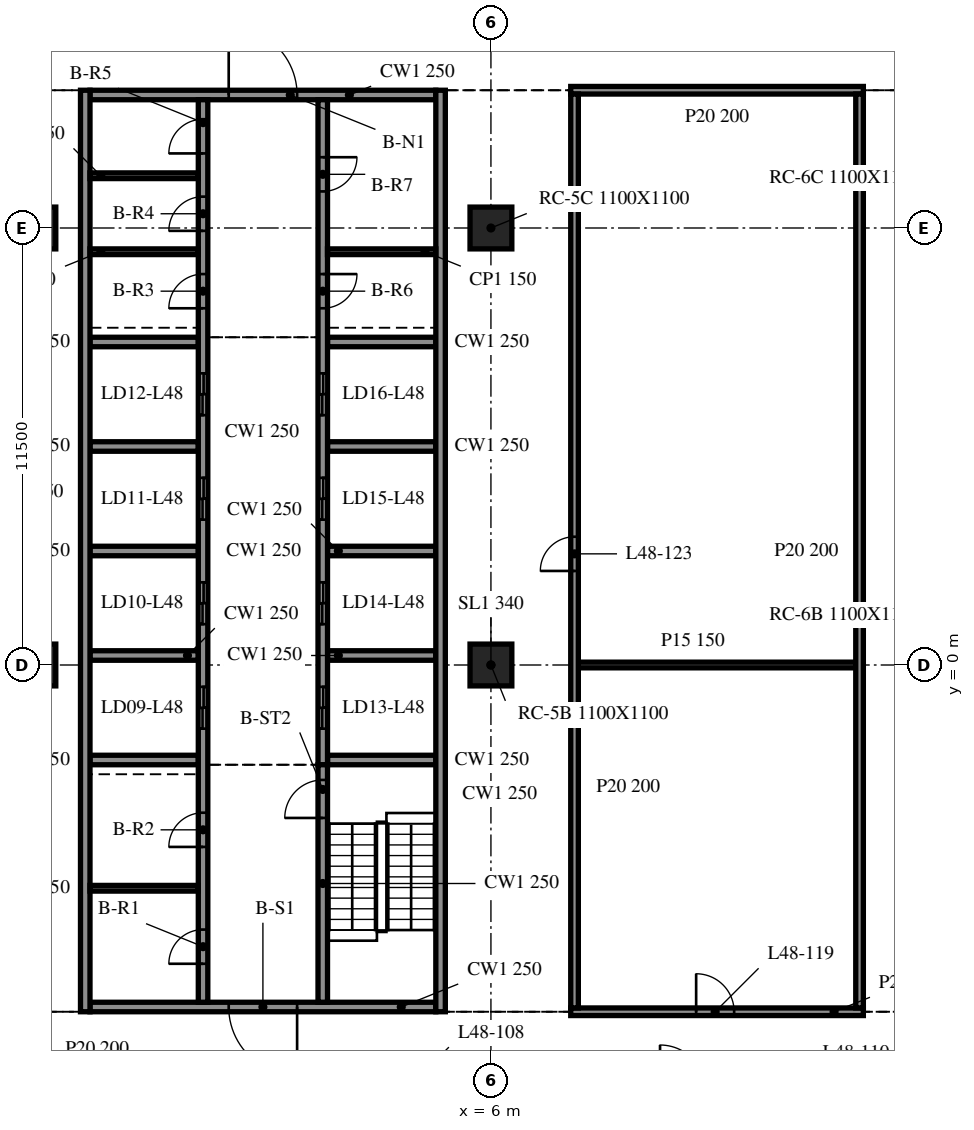
"""IFC4 building model, lengths in metres.
Left out: names, types, materials, properties, quantities, classifications, styles, units other than length and angle.
Written with IfcOpenShell. Run it as: python <this file> out.ifc"""

import sys

from ifc_helpers import new_model, si_unit, direction, frame, frame_2d, origin, origin_2d, place, context, subcontext, project, spatial, rectangle, extrude, element, fill, save


model = new_model("IFC4")
c1 = context("Model", 3, precision=1e-05, world=origin(), true_north=direction((0.0, 1.0)))
c2 = subcontext(c1, "Body", "Model", "MODEL_VIEW")
j1 = project(units=[si_unit("LENGTHUNIT", "METRE"), si_unit("PLANEANGLEUNIT", "RADIAN")], contexts=[c1])
p1 = place(None, origin())
s1 = spatial("IfcSite", under=j1, at=p1, CompositionType="ELEMENT")
p2 = place(p1, origin())
s2 = spatial("IfcBuilding", under=s1, at=p2, CompositionType="ELEMENT")
p3 = place(p2, frame((0.0, 0.0, 201.5)))
s3 = spatial("IfcBuildingStorey", under=s2, at=p3, CompositionType="ELEMENT", Elevation=201.5)
for number, where, z_axis, x_axis in (
    (1, (-6.0, 0.0, -0.34), (0.0, 0.0, 1.0), (1.0, 0.0, 0.0)),
    (2, (-6.0, 11.5, -0.34), (0.0, 0.0, 1.0), (1.0, 0.0, 0.0)),
    (3, (6.0, 0.0, -0.34), (0.0, 0.0, 1.0), (1.0, 0.0, 0.0)),
    (4, (6.0, 11.5, -0.34), (0.0, 0.0, 1.0), (1.0, 0.0, 0.0)),
):
    element("IfcColumn", number, at=place(p3, frame(where, z_axis=z_axis, x_axis=x_axis)), inside=s3, PredefinedType="COLUMN", context=c2, shape_type="SweptSolid", body=[
        extrude(rectangle(XDim=1.1, YDim=1.1, at=origin_2d()), origin(), (0.0, 0.0, 1.0), 3.8),
    ])
for number, where, z_axis, x_axis in (
    (5, (-4.675, 15.125, 0.0), (0.0, 0.0, 1.0), (0.0, -1.0, 0.0)),
    (6, (4.675, -9.125, 0.0), (0.0, 0.0, 1.0), (0.0, 1.0, 0.0)),
):
    element("IfcWall", number, at=place(p3, frame(where, z_axis=z_axis, x_axis=x_axis)), inside=s3, PredefinedType="SOLIDWALL", context=c2, shape_type="SweptSolid", body=[
        extrude(rectangle(XDim=24.25, YDim=0.25, at=frame_2d((12.125, 0.0))), origin(), (0.0, 0.0, 1.0), 3.46),
    ])
p4 = place(p3, frame((4.55, -9.0, 0.0), z_axis=(0.0, 0.0, 1.0), x_axis=(-1.0, 0.0, 0.0)))
e7 = element("IfcWall", 7, at=p4, inside=s3, PredefinedType="SOLIDWALL", context=c2, shape_type="SweptSolid", body=[
    extrude(rectangle(XDim=9.1, YDim=0.25, at=frame_2d((4.55, 0.0))), origin(), (0.0, 0.0, 1.0), 3.46),
])
p5 = place(p4, frame((3.65, 0.0, 0.0)))
e8 = element("IfcOpeningElement", 8, at=p5, cuts=e7, PredefinedType="OPENING", context=c2, shape_type="SweptSolid", body=[
    extrude(rectangle(XDim=1.8, YDim=2.1, at=frame_2d((0.9, 1.05))), frame((0.0, 0.135, 0.0), z_axis=(0.0, -1.0, 0.0), x_axis=(1.0, 0.0, 0.0)), (0.0, 0.0, 1.0), 0.27),
])
p6 = place(p3, frame((-4.55, 15.0, 0.0), z_axis=(0.0, 0.0, 1.0), x_axis=(1.0, 0.0, 0.0)))
e9 = element("IfcWall", 9, at=p6, inside=s3, PredefinedType="SOLIDWALL", context=c2, shape_type="SweptSolid", body=[
    extrude(rectangle(XDim=9.1, YDim=0.25, at=frame_2d((4.55, 0.0))), origin(), (0.0, 0.0, 1.0), 3.46),
])
p7 = place(p6, frame((3.65, 0.0, 0.0)))
e10 = element("IfcOpeningElement", 10, at=p7, cuts=e9, PredefinedType="OPENING", context=c2, shape_type="SweptSolid", body=[
    extrude(rectangle(XDim=1.8, YDim=2.1, at=frame_2d((0.9, 1.05))), frame((0.0, 0.135, 0.0), z_axis=(0.0, -1.0, 0.0), x_axis=(1.0, 0.0, 0.0)), (0.0, 0.0, 1.0), 0.27),
])
p8 = place(p3, frame((-1.575, -8.875, 0.0), z_axis=(0.0, 0.0, 1.0), x_axis=(0.0, 1.0, 0.0)))
e11 = element("IfcWall", 11, at=p8, inside=s3, PredefinedType="SOLIDWALL", context=c2, shape_type="SweptSolid", body=[
    extrude(rectangle(XDim=23.75, YDim=0.25, at=frame_2d((11.875, 0.0))), origin(), (0.0, 0.0, 1.0), 3.46),
])
p9 = place(p8, frame((7.2, 0.0, 0.0)))
e12 = element("IfcOpeningElement", 12, at=p9, cuts=e11, PredefinedType="OPENING", context=c2, shape_type="SweptSolid", body=[
    extrude(rectangle(XDim=1.1, YDim=2.1, at=frame_2d((0.55, 1.05))), frame((0.0, 0.135, 0.0), z_axis=(0.0, -1.0, 0.0), x_axis=(1.0, 0.0, 0.0)), (0.0, 0.0, 1.0), 0.27),
])
p10 = place(p8, frame((9.95, 0.0, 0.0)))
e13 = element("IfcOpeningElement", 13, at=p10, cuts=e11, PredefinedType="OPENING", context=c2, shape_type="SweptSolid", body=[
    extrude(rectangle(XDim=1.1, YDim=2.1, at=frame_2d((0.55, 1.05))), frame((0.0, 0.135, 0.0), z_axis=(0.0, -1.0, 0.0), x_axis=(1.0, 0.0, 0.0)), (0.0, 0.0, 1.0), 0.27),
])
p11 = place(p8, frame((12.7, 0.0, 0.0)))
e14 = element("IfcOpeningElement", 14, at=p11, cuts=e11, PredefinedType="OPENING", context=c2, shape_type="SweptSolid", body=[
    extrude(rectangle(XDim=1.1, YDim=2.1, at=frame_2d((0.55, 1.05))), frame((0.0, 0.135, 0.0), z_axis=(0.0, -1.0, 0.0), x_axis=(1.0, 0.0, 0.0)), (0.0, 0.0, 1.0), 0.27),
])
p12 = place(p8, frame((15.45, 0.0, 0.0)))
e15 = element("IfcOpeningElement", 15, at=p12, cuts=e11, PredefinedType="OPENING", context=c2, shape_type="SweptSolid", body=[
    extrude(rectangle(XDim=1.1, YDim=2.1, at=frame_2d((0.55, 1.05))), frame((0.0, 0.135, 0.0), z_axis=(0.0, -1.0, 0.0), x_axis=(1.0, 0.0, 0.0)), (0.0, 0.0, 1.0), 0.27),
])
p13 = place(p8, frame((1.012, 0.0, 0.0)))
e16 = element("IfcOpeningElement", 16, at=p13, cuts=e11, PredefinedType="OPENING", context=c2, shape_type="SweptSolid", body=[
    extrude(rectangle(XDim=0.9, YDim=2.1, at=frame_2d((0.45, 1.05))), frame((0.0, 0.135, 0.0), z_axis=(0.0, -1.0, 0.0), x_axis=(1.0, 0.0, 0.0)), (0.0, 0.0, 1.0), 0.27),
])
p14 = place(p8, frame((4.087, 0.0, 0.0)))
e17 = element("IfcOpeningElement", 17, at=p14, cuts=e11, PredefinedType="OPENING", context=c2, shape_type="SweptSolid", body=[
    extrude(rectangle(XDim=0.9, YDim=2.1, at=frame_2d((0.45, 1.05))), frame((0.0, 0.135, 0.0), z_axis=(0.0, -1.0, 0.0), x_axis=(1.0, 0.0, 0.0)), (0.0, 0.0, 1.0), 0.27),
])
p15 = place(p8, frame((18.262, 0.0, 0.0)))
e18 = element("IfcOpeningElement", 18, at=p15, cuts=e11, PredefinedType="OPENING", context=c2, shape_type="SweptSolid", body=[
    extrude(rectangle(XDim=0.9, YDim=2.1, at=frame_2d((0.45, 1.05))), frame((0.0, 0.135, 0.0), z_axis=(0.0, -1.0, 0.0), x_axis=(1.0, 0.0, 0.0)), (0.0, 0.0, 1.0), 0.27),
])
p16 = place(p8, frame((20.3, 0.0, 0.0)))
e19 = element("IfcOpeningElement", 19, at=p16, cuts=e11, PredefinedType="OPENING", context=c2, shape_type="SweptSolid", body=[
    extrude(rectangle(XDim=0.9, YDim=2.1, at=frame_2d((0.45, 1.05))), frame((0.0, 0.135, 0.0), z_axis=(0.0, -1.0, 0.0), x_axis=(1.0, 0.0, 0.0)), (0.0, 0.0, 1.0), 0.27),
])
p17 = place(p8, frame((22.337, 0.0, 0.0)))
e20 = element("IfcOpeningElement", 20, at=p17, cuts=e11, PredefinedType="OPENING", context=c2, shape_type="SweptSolid", body=[
    extrude(rectangle(XDim=0.9, YDim=2.1, at=frame_2d((0.45, 1.05))), frame((0.0, 0.135, 0.0), z_axis=(0.0, -1.0, 0.0), x_axis=(1.0, 0.0, 0.0)), (0.0, 0.0, 1.0), 0.27),
])
p18 = place(p3, frame((1.575, -8.875, 0.0), z_axis=(0.0, 0.0, 1.0), x_axis=(0.0, 1.0, 0.0)))
e21 = element("IfcWall", 21, at=p18, inside=s3, PredefinedType="SOLIDWALL", context=c2, shape_type="SweptSolid", body=[
    extrude(rectangle(XDim=6.25, YDim=0.25, at=frame_2d((3.125, 0.0))), origin(), (0.0, 0.0, 1.0), 3.46),
])
p19 = place(p18, frame((4.85, 0.0, 0.0)))
e22 = element("IfcOpeningElement", 22, at=p19, cuts=e21, PredefinedType="OPENING", context=c2, shape_type="SweptSolid", body=[
    extrude(rectangle(XDim=1.0, YDim=2.1, at=frame_2d((0.5, 1.05))), frame((0.0, 0.135, 0.0), z_axis=(0.0, -1.0, 0.0), x_axis=(1.0, 0.0, 0.0)), (0.0, 0.0, 1.0), 0.27),
])
p20 = place(p3, frame((1.575, 14.875, 0.0), z_axis=(0.0, 0.0, 1.0), x_axis=(0.0, -1.0, 0.0)))
e23 = element("IfcWall", 23, at=p20, inside=s3, PredefinedType="SOLIDWALL", context=c2, shape_type="SweptSolid", body=[
    extrude(rectangle(XDim=17.5, YDim=0.25, at=frame_2d((8.75, 0.0))), origin(), (0.0, 0.0, 1.0), 3.46),
])
p21 = place(p20, frame((15.45, 0.0, 0.0)))
e24 = element("IfcOpeningElement", 24, at=p21, cuts=e23, PredefinedType="OPENING", context=c2, shape_type="SweptSolid", body=[
    extrude(rectangle(XDim=1.1, YDim=2.1, at=frame_2d((0.55, 1.05))), frame((0.0, 0.135, 0.0), z_axis=(0.0, -1.0, 0.0), x_axis=(1.0, 0.0, 0.0)), (0.0, 0.0, 1.0), 0.27),
])
p22 = place(p20, frame((12.7, 0.0, 0.0)))
e25 = element("IfcOpeningElement", 25, at=p22, cuts=e23, PredefinedType="OPENING", context=c2, shape_type="SweptSolid", body=[
    extrude(rectangle(XDim=1.1, YDim=2.1, at=frame_2d((0.55, 1.05))), frame((0.0, 0.135, 0.0), z_axis=(0.0, -1.0, 0.0), x_axis=(1.0, 0.0, 0.0)), (0.0, 0.0, 1.0), 0.27),
])
p23 = place(p20, frame((9.95, 0.0, 0.0)))
e26 = element("IfcOpeningElement", 26, at=p23, cuts=e23, PredefinedType="OPENING", context=c2, shape_type="SweptSolid", body=[
    extrude(rectangle(XDim=1.1, YDim=2.1, at=frame_2d((0.55, 1.05))), frame((0.0, 0.135, 0.0), z_axis=(0.0, -1.0, 0.0), x_axis=(1.0, 0.0, 0.0)), (0.0, 0.0, 1.0), 0.27),
])
p24 = place(p20, frame((7.2, 0.0, 0.0)))
e27 = element("IfcOpeningElement", 27, at=p24, cuts=e23, PredefinedType="OPENING", context=c2, shape_type="SweptSolid", body=[
    extrude(rectangle(XDim=1.1, YDim=2.1, at=frame_2d((0.55, 1.05))), frame((0.0, 0.135, 0.0), z_axis=(0.0, -1.0, 0.0), x_axis=(1.0, 0.0, 0.0)), (0.0, 0.0, 1.0), 0.27),
])
p25 = place(p20, frame((4.587, 0.0, 0.0)))
e28 = element("IfcOpeningElement", 28, at=p25, cuts=e23, PredefinedType="OPENING", context=c2, shape_type="SweptSolid", body=[
    extrude(rectangle(XDim=0.9, YDim=2.1, at=frame_2d((0.45, 1.05))), frame((0.0, 0.135, 0.0), z_axis=(0.0, -1.0, 0.0), x_axis=(1.0, 0.0, 0.0)), (0.0, 0.0, 1.0), 0.27),
])
p26 = place(p20, frame((1.512, 0.0, 0.0)))
e29 = element("IfcOpeningElement", 29, at=p26, cuts=e23, PredefinedType="OPENING", context=c2, shape_type="SweptSolid", body=[
    extrude(rectangle(XDim=0.9, YDim=2.1, at=frame_2d((0.45, 1.05))), frame((0.0, 0.135, 0.0), z_axis=(0.0, -1.0, 0.0), x_axis=(1.0, 0.0, 0.0)), (0.0, 0.0, 1.0), 0.27),
])
for number, where, z_axis, x_axis in (
    (30, (-4.55, -2.5, 0.0), (0.0, 0.0, 1.0), (1.0, 0.0, 0.0)),
    (31, (-4.55, 0.25, 0.0), (0.0, 0.0, 1.0), (1.0, 0.0, 0.0)),
    (32, (-4.55, 3.0, 0.0), (0.0, 0.0, 1.0), (1.0, 0.0, 0.0)),
    (33, (-4.55, 5.75, 0.0), (0.0, 0.0, 1.0), (1.0, 0.0, 0.0)),
    (34, (-4.55, 8.5, 0.0), (0.0, 0.0, 1.0), (1.0, 0.0, 0.0)),
    (35, (1.7, -2.5, 0.0), (0.0, 0.0, 1.0), (1.0, 0.0, 0.0)),
    (36, (1.7, 0.25, 0.0), (0.0, 0.0, 1.0), (1.0, 0.0, 0.0)),
    (37, (1.7, 3.0, 0.0), (0.0, 0.0, 1.0), (1.0, 0.0, 0.0)),
    (38, (1.7, 5.75, 0.0), (0.0, 0.0, 1.0), (1.0, 0.0, 0.0)),
    (39, (1.7, 8.5, 0.0), (0.0, 0.0, 1.0), (1.0, 0.0, 0.0)),
):
    element("IfcWall", number, at=place(p3, frame(where, z_axis=z_axis, x_axis=x_axis)), inside=s3, PredefinedType="SOLIDWALL", context=c2, shape_type="SweptSolid", body=[
        extrude(rectangle(XDim=2.85, YDim=0.25, at=frame_2d((1.425, 0.0))), origin(), (0.0, 0.0, 1.0), 3.46),
    ])
for number, where, z_axis, x_axis in (
    (40, (-4.55, -5.875, 0.0), (0.0, 0.0, 1.0), (1.0, 0.0, 0.0)),
    (41, (-4.55, 10.875, 0.0), (0.0, 0.0, 1.0), (1.0, 0.0, 0.0)),
    (42, (-4.55, 12.875, 0.0), (0.0, 0.0, 1.0), (1.0, 0.0, 0.0)),
    (43, (1.7, 10.875, 0.0), (0.0, 0.0, 1.0), (1.0, 0.0, 0.0)),
):
    element("IfcWall", number, at=place(p3, frame(where, z_axis=z_axis, x_axis=x_axis)), inside=s3, PredefinedType="PARTITIONING", context=c2, shape_type="SweptSolid", body=[
        extrude(rectangle(XDim=2.85, YDim=0.15, at=frame_2d((1.425, 0.0))), origin(), (0.0, 0.0, 1.0), 3.46),
    ])
p27 = place(p3, frame((8.1, -9.125, 0.0), z_axis=(0.0, 0.0, 1.0), x_axis=(1.0, 0.0, 0.0)))
e44 = element("IfcWall", 44, at=p27, inside=s3, PredefinedType="PARTITIONING", context=c2, shape_type="SweptSolid", body=[
    extrude(rectangle(XDim=7.7, YDim=0.2, at=frame_2d((3.85, 0.0))), origin(), (0.0, 0.0, 1.0), 3.46),
])
p28 = place(p27, frame((3.3, 0.0, 0.0)))
e45 = element("IfcOpeningElement", 45, at=p28, cuts=e44, PredefinedType="OPENING", context=c2, shape_type="SweptSolid", body=[
    extrude(rectangle(XDim=1.0, YDim=2.1, at=frame_2d((0.5, 1.05))), frame((0.0, 0.11, 0.0), z_axis=(0.0, -1.0, 0.0), x_axis=(1.0, 0.0, 0.0)), (0.0, 0.0, 1.0), 0.22),
])
p29 = place(p3, frame((8.3, 0.0, 0.0), z_axis=(0.0, 0.0, 1.0), x_axis=(1.0, 0.0, 0.0)))
e46 = element("IfcWall", 46, at=p29, inside=s3, PredefinedType="PARTITIONING", context=c2, shape_type="SweptSolid", body=[
    extrude(rectangle(XDim=7.3, YDim=0.15, at=frame_2d((3.65, 0.0))), origin(), (0.0, 0.0, 1.0), 3.46),
])
p30 = place(p3, frame((8.1, 15.125, 0.0), z_axis=(0.0, 0.0, 1.0), x_axis=(1.0, 0.0, 0.0)))
e47 = element("IfcWall", 47, at=p30, inside=s3, PredefinedType="PARTITIONING", context=c2, shape_type="SweptSolid", body=[
    extrude(rectangle(XDim=7.7, YDim=0.2, at=frame_2d((3.85, 0.0))), origin(), (0.0, 0.0, 1.0), 3.46),
])
p31 = place(p3, frame((8.2, -9.025, 0.0), z_axis=(0.0, 0.0, 1.0), x_axis=(0.0, 1.0, 0.0)))
e48 = element("IfcWall", 48, at=p31, inside=s3, PredefinedType="PARTITIONING", context=c2, shape_type="SweptSolid", body=[
    extrude(rectangle(XDim=24.05, YDim=0.2, at=frame_2d((12.025, 0.0))), origin(), (0.0, 0.0, 1.0), 3.46),
])
p32 = place(p31, frame((11.5, 0.0, 0.0)))
e49 = element("IfcOpeningElement", 49, at=p32, cuts=e48, PredefinedType="OPENING", context=c2, shape_type="SweptSolid", body=[
    extrude(rectangle(XDim=0.9, YDim=2.1, at=frame_2d((0.45, 1.05))), frame((0.0, 0.11, 0.0), z_axis=(0.0, -1.0, 0.0), x_axis=(1.0, 0.0, 0.0)), (0.0, 0.0, 1.0), 0.22),
])
p33 = place(p3, frame((15.7, -9.025, 0.0), z_axis=(0.0, 0.0, 1.0), x_axis=(0.0, 1.0, 0.0)))
e50 = element("IfcWall", 50, at=p33, inside=s3, PredefinedType="PARTITIONING", context=c2, shape_type="SweptSolid", body=[
    extrude(rectangle(XDim=24.05, YDim=0.2, at=frame_2d((12.025, 0.0))), origin(), (0.0, 0.0, 1.0), 3.46),
])
p34 = place(p5, origin())
e51 = element("IfcDoor", 51, at=p34, inside=s3, OperationType="DOUBLE_DOOR_SINGLE_SWING", PredefinedType="DOOR", context=c2, shape_type="SweptSolid", body=[
    extrude(rectangle(XDim=1.8, YDim=2.1, at=frame_2d((0.9, 1.05))), frame((0.0, 0.025, 0.0), z_axis=(0.0, -1.0, 0.0), x_axis=(1.0, 0.0, 0.0)), (0.0, 0.0, 1.0), 0.05),
])
fill(e8, e51)
p35 = place(p7, origin())
e52 = element("IfcDoor", 52, at=p35, inside=s3, OperationType="DOUBLE_DOOR_SINGLE_SWING", PredefinedType="DOOR", context=c2, shape_type="SweptSolid", body=[
    extrude(rectangle(XDim=1.8, YDim=2.1, at=frame_2d((0.9, 1.05))), frame((0.0, 0.025, 0.0), z_axis=(0.0, -1.0, 0.0), x_axis=(1.0, 0.0, 0.0)), (0.0, 0.0, 1.0), 0.05),
])
fill(e10, e52)
p36 = place(p21, origin())
e53 = element("IfcDoor", 53, at=p36, inside=s3, OperationType="DOUBLE_DOOR_SLIDING", PredefinedType="DOOR", context=c2, shape_type="SweptSolid", body=[
    extrude(rectangle(XDim=1.1, YDim=2.1, at=frame_2d((0.55, 1.05))), frame((0.0, 0.025, 0.0), z_axis=(0.0, -1.0, 0.0), x_axis=(1.0, 0.0, 0.0)), (0.0, 0.0, 1.0), 0.05),
])
fill(e24, e53)
p37 = place(p22, origin())
e54 = element("IfcDoor", 54, at=p37, inside=s3, OperationType="DOUBLE_DOOR_SLIDING", PredefinedType="DOOR", context=c2, shape_type="SweptSolid", body=[
    extrude(rectangle(XDim=1.1, YDim=2.1, at=frame_2d((0.55, 1.05))), frame((0.0, 0.025, 0.0), z_axis=(0.0, -1.0, 0.0), x_axis=(1.0, 0.0, 0.0)), (0.0, 0.0, 1.0), 0.05),
])
fill(e25, e54)
p38 = place(p23, origin())
e55 = element("IfcDoor", 55, at=p38, inside=s3, OperationType="DOUBLE_DOOR_SLIDING", PredefinedType="DOOR", context=c2, shape_type="SweptSolid", body=[
    extrude(rectangle(XDim=1.1, YDim=2.1, at=frame_2d((0.55, 1.05))), frame((0.0, 0.025, 0.0), z_axis=(0.0, -1.0, 0.0), x_axis=(1.0, 0.0, 0.0)), (0.0, 0.0, 1.0), 0.05),
])
fill(e26, e55)
p39 = place(p24, origin())
e56 = element("IfcDoor", 56, at=p39, inside=s3, OperationType="DOUBLE_DOOR_SLIDING", PredefinedType="DOOR", context=c2, shape_type="SweptSolid", body=[
    extrude(rectangle(XDim=1.1, YDim=2.1, at=frame_2d((0.55, 1.05))), frame((0.0, 0.025, 0.0), z_axis=(0.0, -1.0, 0.0), x_axis=(1.0, 0.0, 0.0)), (0.0, 0.0, 1.0), 0.05),
])
fill(e27, e56)
p40 = place(p9, origin())
e57 = element("IfcDoor", 57, at=p40, inside=s3, OperationType="DOUBLE_DOOR_SLIDING", PredefinedType="DOOR", context=c2, shape_type="SweptSolid", body=[
    extrude(rectangle(XDim=1.1, YDim=2.1, at=frame_2d((0.55, 1.05))), frame((0.0, 0.025, 0.0), z_axis=(0.0, -1.0, 0.0), x_axis=(1.0, 0.0, 0.0)), (0.0, 0.0, 1.0), 0.05),
])
fill(e12, e57)
p41 = place(p10, origin())
e58 = element("IfcDoor", 58, at=p41, inside=s3, OperationType="DOUBLE_DOOR_SLIDING", PredefinedType="DOOR", context=c2, shape_type="SweptSolid", body=[
    extrude(rectangle(XDim=1.1, YDim=2.1, at=frame_2d((0.55, 1.05))), frame((0.0, 0.025, 0.0), z_axis=(0.0, -1.0, 0.0), x_axis=(1.0, 0.0, 0.0)), (0.0, 0.0, 1.0), 0.05),
])
fill(e13, e58)
p42 = place(p11, origin())
e59 = element("IfcDoor", 59, at=p42, inside=s3, OperationType="DOUBLE_DOOR_SLIDING", PredefinedType="DOOR", context=c2, shape_type="SweptSolid", body=[
    extrude(rectangle(XDim=1.1, YDim=2.1, at=frame_2d((0.55, 1.05))), frame((0.0, 0.025, 0.0), z_axis=(0.0, -1.0, 0.0), x_axis=(1.0, 0.0, 0.0)), (0.0, 0.0, 1.0), 0.05),
])
fill(e14, e59)
p43 = place(p12, origin())
e60 = element("IfcDoor", 60, at=p43, inside=s3, OperationType="DOUBLE_DOOR_SLIDING", PredefinedType="DOOR", context=c2, shape_type="SweptSolid", body=[
    extrude(rectangle(XDim=1.1, YDim=2.1, at=frame_2d((0.55, 1.05))), frame((0.0, 0.025, 0.0), z_axis=(0.0, -1.0, 0.0), x_axis=(1.0, 0.0, 0.0)), (0.0, 0.0, 1.0), 0.05),
])
fill(e15, e60)
p44 = place(p13, origin())
e61 = element("IfcDoor", 61, at=p44, inside=s3, OperationType="SINGLE_SWING_LEFT", PredefinedType="DOOR", context=c2, shape_type="SweptSolid", body=[
    extrude(rectangle(XDim=0.9, YDim=2.1, at=frame_2d((0.45, 1.05))), frame((0.0, 0.025, 0.0), z_axis=(0.0, -1.0, 0.0), x_axis=(1.0, 0.0, 0.0)), (0.0, 0.0, 1.0), 0.05),
])
fill(e16, e61)
p45 = place(p14, origin())
e62 = element("IfcDoor", 62, at=p45, inside=s3, OperationType="SINGLE_SWING_RIGHT", PredefinedType="DOOR", context=c2, shape_type="SweptSolid", body=[
    extrude(rectangle(XDim=0.9, YDim=2.1, at=frame_2d((0.45, 1.05))), frame((0.0, 0.025, 0.0), z_axis=(0.0, -1.0, 0.0), x_axis=(1.0, 0.0, 0.0)), (0.0, 0.0, 1.0), 0.05),
])
fill(e17, e62)
p46 = place(p15, origin())
e63 = element("IfcDoor", 63, at=p46, inside=s3, OperationType="SINGLE_SWING_LEFT", PredefinedType="DOOR", context=c2, shape_type="SweptSolid", body=[
    extrude(rectangle(XDim=0.9, YDim=2.1, at=frame_2d((0.45, 1.05))), frame((0.0, 0.025, 0.0), z_axis=(0.0, -1.0, 0.0), x_axis=(1.0, 0.0, 0.0)), (0.0, 0.0, 1.0), 0.05),
])
fill(e18, e63)
p47 = place(p16, origin())
e64 = element("IfcDoor", 64, at=p47, inside=s3, OperationType="SINGLE_SWING_RIGHT", PredefinedType="DOOR", context=c2, shape_type="SweptSolid", body=[
    extrude(rectangle(XDim=0.9, YDim=2.1, at=frame_2d((0.45, 1.05))), frame((0.0, 0.025, 0.0), z_axis=(0.0, -1.0, 0.0), x_axis=(1.0, 0.0, 0.0)), (0.0, 0.0, 1.0), 0.05),
])
fill(e19, e64)
p48 = place(p17, origin())
e65 = element("IfcDoor", 65, at=p48, inside=s3, OperationType="SINGLE_SWING_LEFT", PredefinedType="DOOR", context=c2, shape_type="SweptSolid", body=[
    extrude(rectangle(XDim=0.9, YDim=2.1, at=frame_2d((0.45, 1.05))), frame((0.0, 0.025, 0.0), z_axis=(0.0, -1.0, 0.0), x_axis=(1.0, 0.0, 0.0)), (0.0, 0.0, 1.0), 0.05),
])
fill(e20, e65)
p49 = place(p25, origin())
e66 = element("IfcDoor", 66, at=p49, inside=s3, OperationType="SINGLE_SWING_RIGHT", PredefinedType="DOOR", context=c2, shape_type="SweptSolid", body=[
    extrude(rectangle(XDim=0.9, YDim=2.1, at=frame_2d((0.45, 1.05))), frame((0.0, 0.025, 0.0), z_axis=(0.0, -1.0, 0.0), x_axis=(1.0, 0.0, 0.0)), (0.0, 0.0, 1.0), 0.05),
])
fill(e28, e66)
p50 = place(p26, origin())
e67 = element("IfcDoor", 67, at=p50, inside=s3, OperationType="SINGLE_SWING_LEFT", PredefinedType="DOOR", context=c2, shape_type="SweptSolid", body=[
    extrude(rectangle(XDim=0.9, YDim=2.1, at=frame_2d((0.45, 1.05))), frame((0.0, 0.025, 0.0), z_axis=(0.0, -1.0, 0.0), x_axis=(1.0, 0.0, 0.0)), (0.0, 0.0, 1.0), 0.05),
])
fill(e29, e67)
p51 = place(p19, origin())
e68 = element("IfcDoor", 68, at=p51, inside=s3, OperationType="SINGLE_SWING_RIGHT", PredefinedType="DOOR", context=c2, shape_type="SweptSolid", body=[
    extrude(rectangle(XDim=1.0, YDim=2.1, at=frame_2d((0.5, 1.05))), frame((0.0, 0.025, 0.0), z_axis=(0.0, -1.0, 0.0), x_axis=(1.0, 0.0, 0.0)), (0.0, 0.0, 1.0), 0.05),
])
fill(e22, e68)
p52 = place(p28, origin())
e69 = element("IfcDoor", 69, at=p52, inside=s3, OperationType="SINGLE_SWING_LEFT", PredefinedType="DOOR", context=c2, shape_type="SweptSolid", body=[
    extrude(rectangle(XDim=1.0, YDim=2.1, at=frame_2d((0.5, 1.05))), frame((0.0, 0.025, 0.0), z_axis=(0.0, -1.0, 0.0), x_axis=(1.0, 0.0, 0.0)), (0.0, 0.0, 1.0), 0.05),
])
fill(e45, e69)
p53 = place(p32, origin())
e70 = element("IfcDoor", 70, at=p53, inside=s3, OperationType="SINGLE_SWING_RIGHT", PredefinedType="DOOR", context=c2, shape_type="SweptSolid", body=[
    extrude(rectangle(XDim=0.9, YDim=2.1, at=frame_2d((0.45, 1.05))), frame((0.0, 0.025, 0.0), z_axis=(0.0, -1.0, 0.0), x_axis=(1.0, 0.0, 0.0)), (0.0, 0.0, 1.0), 0.05),
])
fill(e49, e70)
save(model, sys.argv[1])
